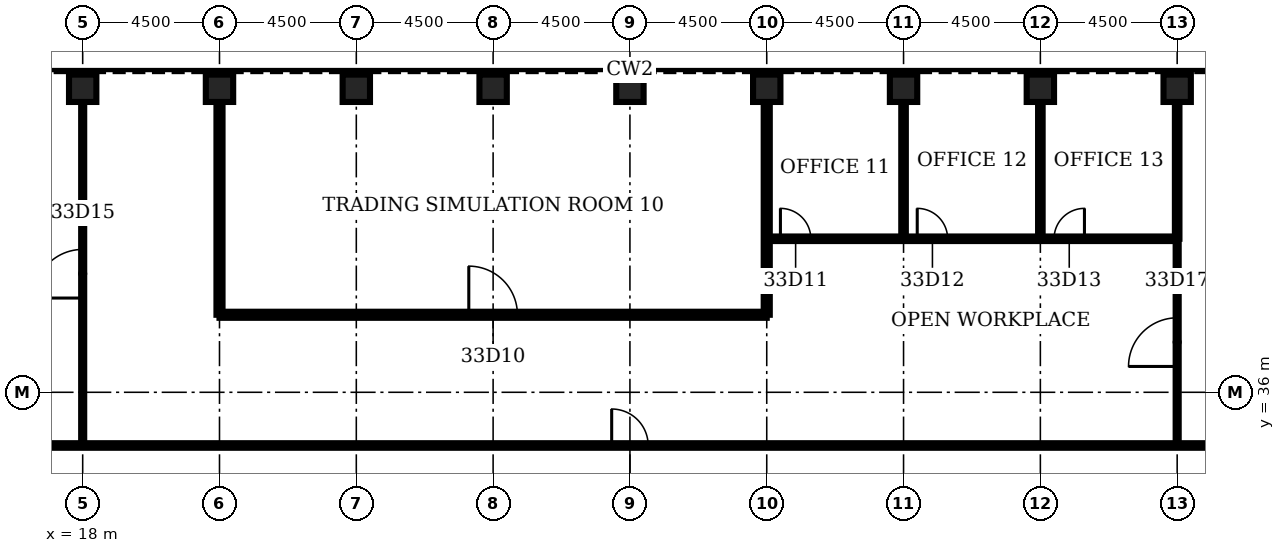
"""IFC4 building model, lengths in metres.
Left out: names, types, materials, properties, quantities, classifications, styles, units other than length and angle.
Written with IfcOpenShell. Run it as: python <this file> out.ifc"""

import sys

from ifc_helpers import new_model, si_unit, direction, frame, frame_2d, origin, origin_2d, place, context, subcontext, project, spatial, rectangle, hollow_rectangle, extrude, element, fill, save


model = new_model("IFC4")
c1 = context("Model", 3, precision=1e-05, world=origin(), true_north=direction((0.0, 1.0)))
c2 = subcontext(c1, "Body", "Model", "MODEL_VIEW")
j1 = project(units=[si_unit("LENGTHUNIT", "METRE"), si_unit("PLANEANGLEUNIT", "RADIAN")], contexts=[c1])
p1 = place(None, origin())
s1 = spatial("IfcSite", under=j1, at=p1, CompositionType="ELEMENT")
p2 = place(p1, origin())
s2 = spatial("IfcBuilding", under=s1, at=p2, CompositionType="ELEMENT")
p3 = place(p2, frame((0.0, 0.0, 150.9)))
s3 = spatial("IfcBuildingStorey", under=s2, at=p3, CompositionType="ELEMENT", Elevation=150.9)
for number, where, z_axis, x_axis in (
    (1, (54.0, 46.0, 0.0), (0.0, 0.0, 1.0), (0.0, 1.0, 0.0)),
    (2, (49.5, 46.0, 0.0), (0.0, 0.0, 1.0), (0.0, 1.0, 0.0)),
    (3, (45.0, 46.0, 0.0), (0.0, 0.0, 1.0), (0.0, 1.0, 0.0)),
    (4, (40.5, 46.0, 0.0), (0.0, 0.0, 1.0), (0.0, 1.0, 0.0)),
    (5, (36.0, 46.0, 0.0), (0.0, 0.0, 1.0), (0.0, 1.0, 0.0)),
    (6, (31.5, 46.0, 0.0), (0.0, 0.0, 1.0), (0.0, 1.0, 0.0)),
    (7, (27.0, 46.0, 0.0), (0.0, 0.0, 1.0), (0.0, 1.0, 0.0)),
    (8, (22.5, 46.0, 0.0), (0.0, 0.0, 1.0), (0.0, 1.0, 0.0)),
    (9, (18.0, 46.0, 0.0), (0.0, 0.0, 1.0), (0.0, 1.0, 0.0)),
):
    element("IfcColumn", number, at=place(p3, frame(where, z_axis=z_axis, x_axis=x_axis)), inside=s3, PredefinedType="COLUMN", context=c2, shape_type="SweptSolid", body=[
        extrude(hollow_rectangle(XDim=0.9, YDim=0.9, WallThickness=0.1, at=origin_2d()), origin(), (0.0, 0.0, 1.0), 4.2),
    ])
p4 = place(p3, frame((15.15, 34.25, 0.0), z_axis=(0.0, 0.0, 1.0), x_axis=(1.0, 0.0, 0.0)))
e10 = element("IfcWall", 10, at=p4, inside=s3, PredefinedType="PARTITIONING", context=c2, shape_type="SweptSolid", body=[
    extrude(rectangle(XDim=41.7, YDim=0.15, at=frame_2d((20.85, 0.0))), origin(), (0.0, 0.0, 1.0), 3.0),
])
p5 = place(p4, frame((20.25, 0.0, 0.0)))
e11 = element("IfcOpeningElement", 11, at=p5, cuts=e10, PredefinedType="OPENING", context=c2, shape_type="SweptSolid", body=[
    extrude(rectangle(XDim=1.2, YDim=2.1, at=frame_2d((0.6, 1.05))), frame((0.0, 0.085, 0.0), z_axis=(0.0, -1.0, 0.0), x_axis=(1.0, 0.0, 0.0)), (0.0, 0.0, 1.0), 0.17),
])
p6 = place(p3, frame((22.5, 38.55, 0.0), z_axis=(0.0, 0.0, 1.0), x_axis=(1.0, 0.0, 0.0)))
e12 = element("IfcWall", 12, at=p6, inside=s3, PredefinedType="PARTITIONING", context=c2, shape_type="SweptSolid", body=[
    extrude(rectangle(XDim=18.0, YDim=0.2, at=frame_2d((9.0, 0.0))), origin(), (0.0, 0.0, 1.0), 3.0),
])
p7 = place(p6, frame((8.2, 0.0, 0.0)))
e13 = element("IfcOpeningElement", 13, at=p7, cuts=e12, PredefinedType="OPENING", context=c2, shape_type="SweptSolid", body=[
    extrude(rectangle(XDim=1.6, YDim=2.1, at=frame_2d((0.8, 1.05))), frame((0.0, 0.11, 0.0), z_axis=(0.0, -1.0, 0.0), x_axis=(1.0, 0.0, 0.0)), (0.0, 0.0, 1.0), 0.22),
])
p8 = place(p3, frame((40.5, 41.05, 0.0), z_axis=(0.0, 0.0, 1.0), x_axis=(1.0, 0.0, 0.0)))
e14 = element("IfcWall", 14, at=p8, inside=s3, PredefinedType="PARTITIONING", context=c2, shape_type="SweptSolid", body=[
    extrude(rectangle(XDim=13.5, YDim=0.15, at=frame_2d((6.75, 0.0))), origin(), (0.0, 0.0, 1.0), 3.0),
])
p9 = place(p8, frame((0.45, 0.0, 0.0)))
e15 = element("IfcOpeningElement", 15, at=p9, cuts=e14, PredefinedType="OPENING", context=c2, shape_type="SweptSolid", body=[
    extrude(rectangle(XDim=1.0, YDim=2.1, at=frame_2d((0.5, 1.05))), frame((0.0, 0.085, 0.0), z_axis=(0.0, -1.0, 0.0), x_axis=(1.0, 0.0, 0.0)), (0.0, 0.0, 1.0), 0.17),
])
p10 = place(p8, frame((4.95, 0.0, 0.0)))
e16 = element("IfcOpeningElement", 16, at=p10, cuts=e14, PredefinedType="OPENING", context=c2, shape_type="SweptSolid", body=[
    extrude(rectangle(XDim=1.0, YDim=2.1, at=frame_2d((0.5, 1.05))), frame((0.0, 0.085, 0.0), z_axis=(0.0, -1.0, 0.0), x_axis=(1.0, 0.0, 0.0)), (0.0, 0.0, 1.0), 0.17),
])
p11 = place(p8, frame((9.45, 0.0, 0.0)))
e17 = element("IfcOpeningElement", 17, at=p11, cuts=e14, PredefinedType="OPENING", context=c2, shape_type="SweptSolid", body=[
    extrude(rectangle(XDim=1.0, YDim=2.1, at=frame_2d((0.5, 1.05))), frame((0.0, 0.085, 0.0), z_axis=(0.0, -1.0, 0.0), x_axis=(1.0, 0.0, 0.0)), (0.0, 0.0, 1.0), 0.17),
])
p12 = place(p3, frame((18.0, 34.25, 0.0), z_axis=(0.0, 0.0, 1.0), x_axis=(0.0, 1.0, 0.0)))
e18 = element("IfcWall", 18, at=p12, inside=s3, PredefinedType="PARTITIONING", context=c2, shape_type="SweptSolid", body=[
    extrude(rectangle(XDim=11.3, YDim=0.1, at=frame_2d((5.65, 0.0))), origin(), (0.0, 0.0, 1.0), 3.0),
])
p13 = place(p12, frame((4.85, 0.0, 0.0)))
e19 = element("IfcOpeningElement", 19, at=p13, cuts=e18, PredefinedType="OPENING", context=c2, shape_type="SweptSolid", body=[
    extrude(rectangle(XDim=1.6, YDim=2.1, at=frame_2d((0.8, 1.05))), frame((0.0, 0.06, 0.0), z_axis=(0.0, -1.0, 0.0), x_axis=(1.0, 0.0, 0.0)), (0.0, 0.0, 1.0), 0.12),
])
for number, where, z_axis, x_axis in (
    (20, (22.5, 38.55, 0.0), (0.0, 0.0, 1.0), (0.0, 1.0, 0.0)),
    (21, (40.5, 38.55, 0.0), (0.0, 0.0, 1.0), (0.0, 1.0, 0.0)),
):
    element("IfcWall", number, at=place(p3, frame(where, z_axis=z_axis, x_axis=x_axis)), inside=s3, PredefinedType="PARTITIONING", context=c2, shape_type="SweptSolid", body=[
        extrude(rectangle(XDim=7.0, YDim=0.2, at=frame_2d((3.5, 0.0))), origin(), (0.0, 0.0, 1.0), 3.0),
    ])
for number, where, z_axis, x_axis in (
    (22, (45.0, 41.05, 0.0), (0.0, 0.0, 1.0), (0.0, 1.0, 0.0)),
    (23, (49.5, 41.05, 0.0), (0.0, 0.0, 1.0), (0.0, 1.0, 0.0)),
):
    element("IfcWall", number, at=place(p3, frame(where, z_axis=z_axis, x_axis=x_axis)), inside=s3, PredefinedType="PARTITIONING", context=c2, shape_type="SweptSolid", body=[
        extrude(rectangle(XDim=4.5, YDim=0.15, at=frame_2d((2.25, 0.0))), origin(), (0.0, 0.0, 1.0), 3.0),
    ])
p14 = place(p3, frame((54.0, 34.25, 0.0), z_axis=(0.0, 0.0, 1.0), x_axis=(0.0, 1.0, 0.0)))
e24 = element("IfcWall", 24, at=p14, inside=s3, PredefinedType="PARTITIONING", context=c2, shape_type="SweptSolid", body=[
    extrude(rectangle(XDim=6.8, YDim=0.1, at=frame_2d((3.4, 0.0))), origin(), (0.0, 0.0, 1.0), 3.0),
])
p15 = place(p14, frame((2.6, 0.0, 0.0)))
e25 = element("IfcOpeningElement", 25, at=p15, cuts=e24, PredefinedType="OPENING", context=c2, shape_type="SweptSolid", body=[
    extrude(rectangle(XDim=1.6, YDim=2.1, at=frame_2d((0.8, 1.05))), frame((0.0, 0.06, 0.0), z_axis=(0.0, -1.0, 0.0), x_axis=(1.0, 0.0, 0.0)), (0.0, 0.0, 1.0), 0.12),
])
p16 = place(p3, frame((54.0, 41.05, 0.0), z_axis=(0.0, 0.0, 1.0), x_axis=(0.0, 1.0, 0.0)))
e26 = element("IfcWall", 26, at=p16, inside=s3, PredefinedType="PARTITIONING", context=c2, shape_type="SweptSolid", body=[
    extrude(rectangle(XDim=4.5, YDim=0.15, at=frame_2d((2.25, 0.0))), origin(), (0.0, 0.0, 1.0), 3.0),
])
p17 = place(p7, origin())
e27 = element("IfcDoor", 27, at=p17, inside=s3, OperationType="SINGLE_SWING_LEFT", PredefinedType="DOOR", context=c2, shape_type="SweptSolid", body=[
    extrude(rectangle(XDim=1.6, YDim=2.1, at=frame_2d((0.8, 1.05))), frame((0.0, 0.025, 0.0), z_axis=(0.0, -1.0, 0.0), x_axis=(1.0, 0.0, 0.0)), (0.0, 0.0, 1.0), 0.05),
])
fill(e13, e27)
p18 = place(p9, origin())
e28 = element("IfcDoor", 28, at=p18, inside=s3, OperationType="SINGLE_SWING_LEFT", PredefinedType="DOOR", context=c2, shape_type="SweptSolid", body=[
    extrude(rectangle(XDim=1.0, YDim=2.1, at=frame_2d((0.5, 1.05))), frame((0.0, 0.025, 0.0), z_axis=(0.0, -1.0, 0.0), x_axis=(1.0, 0.0, 0.0)), (0.0, 0.0, 1.0), 0.05),
])
fill(e15, e28)
p19 = place(p10, origin())
e29 = element("IfcDoor", 29, at=p19, inside=s3, OperationType="SINGLE_SWING_LEFT", PredefinedType="DOOR", context=c2, shape_type="SweptSolid", body=[
    extrude(rectangle(XDim=1.0, YDim=2.1, at=frame_2d((0.5, 1.05))), frame((0.0, 0.025, 0.0), z_axis=(0.0, -1.0, 0.0), x_axis=(1.0, 0.0, 0.0)), (0.0, 0.0, 1.0), 0.05),
])
fill(e16, e29)
p20 = place(p11, origin())
e30 = element("IfcDoor", 30, at=p20, inside=s3, OperationType="SINGLE_SWING_RIGHT", PredefinedType="DOOR", context=c2, shape_type="SweptSolid", body=[
    extrude(rectangle(XDim=1.0, YDim=2.1, at=frame_2d((0.5, 1.05))), frame((0.0, 0.025, 0.0), z_axis=(0.0, -1.0, 0.0), x_axis=(1.0, 0.0, 0.0)), (0.0, 0.0, 1.0), 0.05),
])
fill(e17, e30)
p21 = place(p13, origin())
e31 = element("IfcDoor", 31, at=p21, inside=s3, OperationType="SINGLE_SWING_LEFT", PredefinedType="DOOR", context=c2, shape_type="SweptSolid", body=[
    extrude(rectangle(XDim=1.6, YDim=2.1, at=frame_2d((0.8, 1.05))), frame((0.0, 0.025, 0.0), z_axis=(0.0, -1.0, 0.0), x_axis=(1.0, 0.0, 0.0)), (0.0, 0.0, 1.0), 0.05),
])
fill(e19, e31)
p22 = place(p15, origin())
e32 = element("IfcDoor", 32, at=p22, inside=s3, OperationType="SINGLE_SWING_LEFT", PredefinedType="DOOR", context=c2, shape_type="SweptSolid", body=[
    extrude(rectangle(XDim=1.6, YDim=2.1, at=frame_2d((0.8, 1.05))), frame((0.0, 0.025, 0.0), z_axis=(0.0, -1.0, 0.0), x_axis=(1.0, 0.0, 0.0)), (0.0, 0.0, 1.0), 0.05),
])
fill(e25, e32)
p23 = place(p5, origin())
e33 = element("IfcDoor", 33, at=p23, inside=s3, OperationType="SINGLE_SWING_LEFT", PredefinedType="DOOR", context=c2, shape_type="SweptSolid", body=[
    extrude(rectangle(XDim=1.2, YDim=2.1, at=frame_2d((0.6, 1.05))), frame((0.0, 0.025, 0.0), z_axis=(0.0, -1.0, 0.0), x_axis=(1.0, 0.0, 0.0)), (0.0, 0.0, 1.0), 0.05),
])
fill(e11, e33)
save(model, sys.argv[1])
